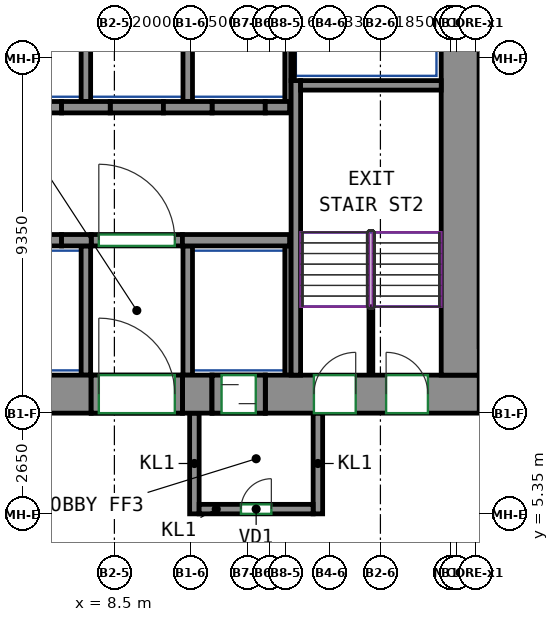
"""IFC4 building model, lengths in metres.
Left out: names, types, materials, properties, quantities, classifications, styles, units other than length and angle.
Written with IfcOpenShell. Run it as: python <this file> out.ifc"""

import sys

from ifc_helpers import new_model, si_unit, direction, frame, frame_2d, origin, place, context, subcontext, project, spatial, rectangle, extrude, source, transform, mapped, element, fill, save


model = new_model("IFC4")
c1 = context("Model", 3, precision=1e-05, world=origin(), true_north=direction((0.0, 1.0)))
c2 = subcontext(c1, "Body", "Model", "MODEL_VIEW")
j1 = project(units=[si_unit("LENGTHUNIT", "METRE"), si_unit("PLANEANGLEUNIT", "RADIAN")], contexts=[c1])
p1 = place(None, origin())
s1 = spatial("IfcSite", under=j1, at=p1, CompositionType="ELEMENT")
p2 = place(p1, origin())
s2 = spatial("IfcBuilding", under=s1, at=p2, CompositionType="ELEMENT")
p3 = place(p2, frame((0.0, 0.0, 95.2)))
s3 = spatial("IfcBuildingStorey", under=s2, at=p3, CompositionType="ELEMENT", Elevation=95.2)
m1 = source(origin(), c2, "Body", "SweptSolid", [
    extrude(rectangle(XDim=14.18, YDim=1.0, at=frame_2d((7.09, 0.0))), origin(), (0.0, 0.0, 1.0), 5.0),
])
p4 = place(p3, frame((-6.29, 8.5, 0.0), z_axis=(0.0, 0.0, 1.0), x_axis=(1.0, 0.0, 0.0)))
e1 = element("IfcWall", 1, at=p4, inside=s3, PredefinedType="SHEAR", context=c2, shape_type="MappedRepresentation", body=[
    mapped(m1, transform((0.0, 0.0, 0.0))),
])
m2 = source(origin(), c2, "Body", "SweptSolid", [
    extrude(rectangle(XDim=0.78, YDim=1.0, at=frame_2d((0.39, 0.0))), origin(), (0.0, 0.0, 1.0), 5.0),
])
p5 = place(p3, frame((10.29, 8.5, 0.0), z_axis=(0.0, 0.0, 1.0), x_axis=(1.0, 0.0, 0.0)))
e2 = element("IfcWall", 2, at=p5, inside=s3, PredefinedType="SHEAR", context=c2, shape_type="MappedRepresentation", body=[
    mapped(m2, transform((0.0, 0.0, 0.0))),
])
m3 = source(origin(), c2, "Body", "SweptSolid", [
    extrude(rectangle(XDim=5.63, YDim=1.0, at=frame_2d((2.815, 0.0))), origin(), (0.0, 0.0, 1.0), 5.0),
])
p6 = place(p3, frame((12.47, 8.5, 0.0), z_axis=(0.0, 0.0, 1.0), x_axis=(1.0, 0.0, 0.0)))
e3 = element("IfcWall", 3, at=p6, inside=s3, PredefinedType="SHEAR", context=c2, shape_type="MappedRepresentation", body=[
    mapped(m3, transform((0.0, 0.0, 0.0))),
])
p7 = place(p6, frame((1.28, 0.0, 0.0)))
e4 = element("IfcOpeningElement", 4, at=p7, cuts=e3, PredefinedType="OPENING", context=c2, shape_type="SweptSolid", body=[
    extrude(rectangle(XDim=1.1, YDim=2.1, at=frame_2d((0.55, 1.05))), frame((0.0, 0.51, 0.0), z_axis=(0.0, -1.0, 0.0), x_axis=(1.0, 0.0, 0.0)), (0.0, 0.0, 1.0), 1.02),
])
p8 = place(p6, frame((3.18, 0.0, 0.0)))
e5 = element("IfcOpeningElement", 5, at=p8, cuts=e3, PredefinedType="OPENING", context=c2, shape_type="SweptSolid", body=[
    extrude(rectangle(XDim=1.1, YDim=2.1, at=frame_2d((0.55, 1.05))), frame((0.0, 0.51, 0.0), z_axis=(0.0, -1.0, 0.0), x_axis=(1.0, 0.0, 0.0)), (0.0, 0.0, 1.0), 1.02),
])
m4 = source(origin(), c2, "Body", "SweptSolid", [
    extrude(rectangle(XDim=12.0, YDim=1.0, at=frame_2d((6.0, 0.0))), origin(), (0.0, 0.0, 1.0), 5.0),
])
p9 = place(p3, frame((17.6, 9.0, 0.0), z_axis=(0.0, 0.0, 1.0), x_axis=(0.0, 1.0, 0.0)))
e6 = element("IfcWall", 6, at=p9, inside=s3, PredefinedType="SHEAR", context=c2, shape_type="MappedRepresentation", body=[
    mapped(m4, transform((0.0, 0.0, 0.0))),
])
m5 = source(origin(), c2, "Body", "SweptSolid", [
    extrude(rectangle(XDim=7.75, YDim=0.25, at=frame_2d((3.875, 0.0))), origin(), (0.0, 0.0, 1.0), 5.0),
])
p10 = place(p3, frame((13.275, 9.0, 0.0), z_axis=(0.0, 0.0, 1.0), x_axis=(0.0, 1.0, 0.0)))
e7 = element("IfcWall", 7, at=p10, inside=s3, PredefinedType="SHEAR", context=c2, shape_type="MappedRepresentation", body=[
    mapped(m5, transform((0.0, 0.0, 0.0))),
])
m6 = source(origin(), c2, "Body", "SweptSolid", [
    extrude(rectangle(XDim=3.7, YDim=0.25, at=frame_2d((1.85, 0.0))), origin(), (0.0, 0.0, 1.0), 5.0),
])
p11 = place(p3, frame((13.4, 16.625, 0.0), z_axis=(0.0, 0.0, 1.0), x_axis=(1.0, 0.0, 0.0)))
e8 = element("IfcWall", 8, at=p11, inside=s3, PredefinedType="SHEAR", context=c2, shape_type="MappedRepresentation", body=[
    mapped(m6, transform((0.0, 0.0, 0.0))),
])
m7 = source(origin(), c2, "Body", "SweptSolid", [
    extrude(rectangle(XDim=0.78, YDim=0.3, at=frame_2d((0.39, 0.0))), origin(), (0.0, 0.0, 1.0), 5.0),
])
p12 = place(p3, frame((7.11, 12.55, 0.0), z_axis=(0.0, 0.0, 1.0), x_axis=(1.0, 0.0, 0.0)))
e9 = element("IfcWall", 9, at=p12, inside=s3, PredefinedType="SHEAR", context=c2, shape_type="MappedRepresentation", body=[
    mapped(m7, transform((0.0, 0.0, 0.0))),
])
m8 = source(origin(), c2, "Body", "SweptSolid", [
    extrude(rectangle(XDim=2.82, YDim=0.3, at=frame_2d((1.41, 0.0))), origin(), (0.0, 0.0, 1.0), 5.0),
])
p13 = place(p3, frame((10.29, 12.55, 0.0), z_axis=(0.0, 0.0, 1.0), x_axis=(1.0, 0.0, 0.0)))
e10 = element("IfcWall", 10, at=p13, inside=s3, PredefinedType="SHEAR", context=c2, shape_type="MappedRepresentation", body=[
    mapped(m8, transform((0.0, 0.0, 0.0))),
])
m9 = source(origin(), c2, "Body", "SweptSolid", [
    extrude(rectangle(XDim=1.28, YDim=0.3, at=frame_2d((0.64, 0.0))), origin(), (0.0, 0.0, 1.0), 5.0),
])
p14 = place(p3, frame((7.11, 16.05, 0.0), z_axis=(0.0, 0.0, 1.0), x_axis=(1.0, 0.0, 0.0)))
e11 = element("IfcWall", 11, at=p14, inside=s3, PredefinedType="SHEAR", context=c2, shape_type="MappedRepresentation", body=[
    mapped(m9, transform((0.0, 0.0, 0.0))),
])
m10 = source(origin(), c2, "Body", "SweptSolid", [
    extrude(rectangle(XDim=1.28, YDim=0.3, at=frame_2d((0.64, 0.0))), origin(), (0.0, 0.0, 1.0), 5.0),
])
p15 = place(p3, frame((9.79, 16.05, 0.0), z_axis=(0.0, 0.0, 1.0), x_axis=(1.0, 0.0, 0.0)))
e12 = element("IfcWall", 12, at=p15, inside=s3, PredefinedType="SHEAR", context=c2, shape_type="MappedRepresentation", body=[
    mapped(m10, transform((0.0, 0.0, 0.0))),
])
m11 = source(origin(), c2, "Body", "SweptSolid", [
    extrude(rectangle(XDim=0.64, YDim=0.3, at=frame_2d((0.32, 0.0))), origin(), (0.0, 0.0, 1.0), 5.0),
])
p16 = place(p3, frame((12.47, 16.05, 0.0), z_axis=(0.0, 0.0, 1.0), x_axis=(1.0, 0.0, 0.0)))
e13 = element("IfcWall", 13, at=p16, inside=s3, PredefinedType="SHEAR", context=c2, shape_type="MappedRepresentation", body=[
    mapped(m11, transform((0.0, 0.0, 0.0))),
])
m12 = source(origin(), c2, "Body", "SweptSolid", [
    extrude(rectangle(XDim=2.4, YDim=1.0, at=frame_2d((1.2, 0.0))), origin(), (0.0, 0.0, 1.0), 0.8),
])
p17 = place(p3, frame((7.89, 8.5, 4.2), z_axis=(0.0, 0.0, 1.0), x_axis=(1.0, 0.0, 0.0)))
e14 = element("IfcWall", 14, at=p17, inside=s3, PredefinedType="SHEAR", context=c2, shape_type="MappedRepresentation", body=[
    mapped(m12, transform((0.0, 0.0, 0.0))),
])
m13 = source(origin(), c2, "Body", "SweptSolid", [
    extrude(rectangle(XDim=1.4, YDim=1.0, at=frame_2d((0.7, 0.0))), origin(), (0.0, 0.0, 1.0), 1.05),
])
p18 = place(p3, frame((11.07, 8.5, 3.95), z_axis=(0.0, 0.0, 1.0), x_axis=(1.0, 0.0, 0.0)))
e15 = element("IfcWall", 15, at=p18, inside=s3, PredefinedType="SHEAR", context=c2, shape_type="MappedRepresentation", body=[
    mapped(m13, transform((0.0, 0.0, 0.0))),
])
m14 = source(origin(), c2, "Body", "SweptSolid", [
    extrude(rectangle(XDim=1.4, YDim=0.3, at=frame_2d((0.7, 0.0))), origin(), (0.0, 0.0, 1.0), 5.0),
])
p19 = place(p3, frame((5.71, 12.55, 0.0), z_axis=(0.0, 0.0, 1.0), x_axis=(1.0, 0.0, 0.0)))
e16 = element("IfcWall", 16, at=p19, inside=s3, PredefinedType="PARTITIONING", context=c2, shape_type="MappedRepresentation", body=[
    mapped(m14, transform((0.0, 0.0, 0.0))),
])
m15 = source(origin(), c2, "Body", "SweptSolid", [
    extrude(rectangle(XDim=1.4, YDim=0.3, at=frame_2d((0.7, 0.0))), origin(), (0.0, 0.0, 1.0), 5.0),
])
p20 = place(p3, frame((11.07, 16.05, 0.0), z_axis=(0.0, 0.0, 1.0), x_axis=(1.0, 0.0, 0.0)))
e17 = element("IfcWall", 17, at=p20, inside=s3, PredefinedType="PARTITIONING", context=c2, shape_type="MappedRepresentation", body=[
    mapped(m15, transform((0.0, 0.0, 0.0))),
])
m16 = source(origin(), c2, "Body", "SweptSolid", [
    extrude(rectangle(XDim=2.4, YDim=0.3, at=frame_2d((1.2, 0.0))), origin(), (0.0, 0.0, 1.0), 5.0),
])
p21 = place(p3, frame((7.89, 12.55, 0.0), z_axis=(0.0, 0.0, 1.0), x_axis=(1.0, 0.0, 0.0)))
e18 = element("IfcWall", 18, at=p21, inside=s3, PredefinedType="PARTITIONING", context=c2, shape_type="MappedRepresentation", body=[
    mapped(m16, transform((0.0, 0.0, 0.0))),
])
p22 = place(p21, frame((0.2, 0.0, 0.0)))
e19 = element("IfcOpeningElement", 19, at=p22, cuts=e18, PredefinedType="OPENING", context=c2, shape_type="SweptSolid", body=[
    extrude(rectangle(XDim=2.0, YDim=2.1, at=frame_2d((1.0, 1.05))), frame((0.0, 0.16, 0.0), z_axis=(0.0, -1.0, 0.0), x_axis=(1.0, 0.0, 0.0)), (0.0, 0.0, 1.0), 0.32),
])
for number, where, z_axis, x_axis in (
    (20, (5.71, 16.05, 0.0), (0.0, 0.0, 1.0), (1.0, 0.0, 0.0)),
    (21, (8.39, 16.05, 0.0), (0.0, 0.0, 1.0), (1.0, 0.0, 0.0)),
):
    element("IfcWall", number, at=place(p3, frame(where, z_axis=z_axis, x_axis=x_axis)), inside=s3, PredefinedType="PARTITIONING", context=c2, shape_type="MappedRepresentation", body=[
        mapped(m14, transform((0.0, 0.0, 0.0))),
    ])
m17 = source(origin(), c2, "Body", "SweptSolid", [
    extrude(rectangle(XDim=2.65, YDim=0.25, at=frame_2d((1.325, 0.0))), origin(), (0.0, 0.0, 1.0), 5.0),
])
for number, where, z_axis, x_axis in (
    (22, (10.605, 5.35, 0.0), (0.0, 0.0, 1.0), (0.0, 1.0, 0.0)),
    (23, (13.855, 5.35, 0.0), (0.0, 0.0, 1.0), (0.0, 1.0, 0.0)),
):
    element("IfcWall", number, at=place(p3, frame(where, z_axis=z_axis, x_axis=x_axis)), inside=s3, PredefinedType="PARTITIONING", context=c2, shape_type="MappedRepresentation", body=[
        mapped(m17, transform((0.0, 0.0, 0.0))),
    ])
m18 = source(origin(), c2, "Body", "SweptSolid", [
    extrude(rectangle(XDim=3.0, YDim=0.25, at=frame_2d((1.5, 0.0))), origin(), (0.0, 0.0, 1.0), 5.0),
])
p23 = place(p3, frame((10.73, 5.475, 0.0), z_axis=(0.0, 0.0, 1.0), x_axis=(1.0, 0.0, 0.0)))
e24 = element("IfcWall", 24, at=p23, inside=s3, PredefinedType="PARTITIONING", context=c2, shape_type="MappedRepresentation", body=[
    mapped(m18, transform((0.0, 0.0, 0.0))),
])
p24 = place(p23, frame((1.1, 0.0, 0.0)))
e25 = element("IfcOpeningElement", 25, at=p24, cuts=e24, PredefinedType="OPENING", context=c2, shape_type="SweptSolid", body=[
    extrude(rectangle(XDim=0.8, YDim=2.0, at=frame_2d((0.4, 1.0))), frame((0.0, 0.135, 0.0), z_axis=(0.0, -1.0, 0.0), x_axis=(1.0, 0.0, 0.0)), (0.0, 0.0, 1.0), 0.27),
])
m19 = source(origin(), c2, "Body", "SweptSolid", [
    extrude(rectangle(XDim=3.275, YDim=0.165, at=frame_2d((1.638, 0.0))), origin(), (0.0, 0.0, 1.0), 5.0),
])
p25 = place(p3, frame((13.067, 16.2, 0.0), z_axis=(0.0, 0.0, 1.0), x_axis=(0.0, 1.0, 0.0)))
e26 = element("IfcWall", 26, at=p25, inside=s3, PredefinedType="PARTITIONING", context=c2, shape_type="MappedRepresentation", body=[
    mapped(m19, transform((0.0, 0.0, 0.0))),
])
m20 = source(origin(), c2, "Body", "SweptSolid", [
    extrude(rectangle(XDim=3.275, YDim=0.25, at=frame_2d((1.638, 0.0))), origin(), (0.0, 0.0, 1.0), 5.0),
])
p26 = place(p3, frame((10.43, 16.2, 0.0), z_axis=(0.0, 0.0, 1.0), x_axis=(0.0, 1.0, 0.0)))
e27 = element("IfcWall", 27, at=p26, inside=s3, PredefinedType="PARTITIONING", context=c2, shape_type="MappedRepresentation", body=[
    mapped(m20, transform((0.0, 0.0, 0.0))),
])
m21 = source(origin(), c2, "Body", "SweptSolid", [
    extrude(rectangle(XDim=2.725, YDim=0.085, at=frame_2d((1.363, 0.0))), origin(), (0.0, 0.0, 1.0), 5.0),
])
p27 = place(p3, frame((13.192, 16.75, 0.0), z_axis=(0.0, 0.0, 1.0), x_axis=(0.0, 1.0, 0.0)))
e28 = element("IfcWall", 28, at=p27, inside=s3, PredefinedType="PARTITIONING", context=c2, shape_type="MappedRepresentation", body=[
    mapped(m21, transform((0.0, 0.0, 0.0))),
])
p28 = place(p3, frame((7.75, 16.2, 0.0), z_axis=(0.0, 0.0, 1.0), x_axis=(0.0, 1.0, 0.0)))
e29 = element("IfcWall", 29, at=p28, inside=s3, PredefinedType="PARTITIONING", context=c2, shape_type="MappedRepresentation", body=[
    mapped(m20, transform((0.0, 0.0, 0.0))),
])
m22 = source(origin(), c2, "Body", "SweptSolid", [
    extrude(rectangle(XDim=3.4, YDim=0.25, at=frame_2d((1.7, 0.0))), origin(), (0.0, 0.0, 1.0), 5.0),
])
p29 = place(p3, frame((10.43, 9.0, 0.0), z_axis=(0.0, 0.0, 1.0), x_axis=(0.0, 1.0, 0.0)))
e30 = element("IfcWall", 30, at=p29, inside=s3, PredefinedType="PARTITIONING", context=c2, shape_type="MappedRepresentation", body=[
    mapped(m22, transform((0.0, 0.0, 0.0))),
])
m23 = source(origin(), c2, "Body", "SweptSolid", [
    extrude(rectangle(XDim=3.4, YDim=0.165, at=frame_2d((1.7, 0.0))), origin(), (0.0, 0.0, 1.0), 5.0),
])
p30 = place(p3, frame((13.067, 9.0, 0.0), z_axis=(0.0, 0.0, 1.0), x_axis=(0.0, 1.0, 0.0)))
e31 = element("IfcWall", 31, at=p30, inside=s3, PredefinedType="PARTITIONING", context=c2, shape_type="MappedRepresentation", body=[
    mapped(m23, transform((0.0, 0.0, 0.0))),
])
p31 = place(p3, frame((7.75, 9.0, 0.0), z_axis=(0.0, 0.0, 1.0), x_axis=(0.0, 1.0, 0.0)))
e32 = element("IfcWall", 32, at=p31, inside=s3, PredefinedType="PARTITIONING", context=c2, shape_type="MappedRepresentation", body=[
    mapped(m22, transform((0.0, 0.0, 0.0))),
])
m24 = source(origin(), c2, "Body", "SweptSolid", [
    extrude(rectangle(XDim=2.4, YDim=1.0, at=frame_2d((1.2, 0.0))), origin(), (0.0, 0.0, 1.0), 2.7),
])
p32 = place(p3, frame((7.89, 8.5, 0.0), z_axis=(0.0, 0.0, 1.0), x_axis=(1.0, 0.0, 0.0)))
e33 = element("IfcWall", 33, at=p32, inside=s3, PredefinedType="PARTITIONING", context=c2, shape_type="MappedRepresentation", body=[
    mapped(m24, transform((0.0, 0.0, 0.0))),
])
p33 = place(p32, frame((0.2, 0.0, 0.0)))
e34 = element("IfcOpeningElement", 34, at=p33, cuts=e33, PredefinedType="OPENING", context=c2, shape_type="SweptSolid", body=[
    extrude(rectangle(XDim=2.0, YDim=2.1, at=frame_2d((1.0, 1.05))), frame((0.0, 0.51, 0.0), z_axis=(0.0, -1.0, 0.0), x_axis=(1.0, 0.0, 0.0)), (0.0, 0.0, 1.0), 1.02),
])
m25 = source(origin(), c2, "Body", "SweptSolid", [
    extrude(rectangle(XDim=1.4, YDim=1.0, at=frame_2d((0.7, 0.0))), origin(), (0.0, 0.0, 1.0), 2.7),
])
p34 = place(p3, frame((11.07, 8.5, 0.0), z_axis=(0.0, 0.0, 1.0), x_axis=(1.0, 0.0, 0.0)))
e35 = element("IfcWall", 35, at=p34, inside=s3, PredefinedType="PARTITIONING", context=c2, shape_type="MappedRepresentation", body=[
    mapped(m25, transform((0.0, 0.0, 0.0))),
])
p35 = place(p34, frame((0.25, 0.0, 0.0)))
e36 = element("IfcOpeningElement", 36, at=p35, cuts=e35, PredefinedType="OPENING", context=c2, shape_type="SweptSolid", body=[
    extrude(rectangle(XDim=0.9, YDim=2.1, at=frame_2d((0.45, 1.05))), frame((0.0, 0.51, 0.0), z_axis=(0.0, -1.0, 0.0), x_axis=(1.0, 0.0, 0.0)), (0.0, 0.0, 1.0), 1.02),
])
m26 = source(origin(), c2, "Body", "SweptSolid", [
    extrude(rectangle(XDim=1.8, YDim=0.1, at=frame_2d((0.9, 0.0))), origin(), (0.0, 0.0, 1.0), 2.5),
])
p36 = place(p3, frame((15.25, 9.0, 0.0), z_axis=(0.0, 0.0, 1.0), x_axis=(0.0, 1.0, 0.0)))
e37 = element("IfcWall", 37, at=p36, inside=s3, PredefinedType="PARTITIONING", context=c2, shape_type="MappedRepresentation", body=[
    mapped(m26, transform((0.0, 0.0, 0.0))),
])
p37 = place(p22, origin())
e38 = element("IfcDoor", 38, at=p37, inside=s3, OperationType="DOUBLE_DOOR_SINGLE_SWING", PredefinedType="DOOR", context=c2, shape_type="SweptSolid", body=[
    extrude(rectangle(XDim=2.0, YDim=2.1, at=frame_2d((1.0, 1.05))), frame((0.0, 0.025, 0.0), z_axis=(0.0, -1.0, 0.0), x_axis=(1.0, 0.0, 0.0)), (0.0, 0.0, 1.0), 0.05),
])
fill(e19, e38)
p38 = place(p33, origin())
e39 = element("IfcDoor", 39, at=p38, inside=s3, OperationType="DOUBLE_DOOR_SINGLE_SWING", PredefinedType="DOOR", context=c2, shape_type="SweptSolid", body=[
    extrude(rectangle(XDim=2.0, YDim=2.1, at=frame_2d((1.0, 1.05))), frame((0.0, 0.405, 0.0), z_axis=(0.0, -1.0, 0.0), x_axis=(1.0, 0.0, 0.0)), (0.0, 0.0, 1.0), 0.05),
])
fill(e34, e39)
p39 = place(p24, origin())
e40 = element("IfcDoor", 40, at=p39, inside=s3, OperationType="SINGLE_SWING_RIGHT", PredefinedType="DOOR", context=c2, shape_type="SweptSolid", body=[
    extrude(rectangle(XDim=0.8, YDim=2.0, at=frame_2d((0.4, 1.0))), frame((0.0, 0.025, 0.0), z_axis=(0.0, -1.0, 0.0), x_axis=(1.0, 0.0, 0.0)), (0.0, 0.0, 1.0), 0.05),
])
fill(e25, e40)
p40 = place(p35, origin())
e41 = element("IfcDoor", 41, at=p40, inside=s3, OperationType="SLIDING_TO_LEFT", PredefinedType="DOOR", context=c2, shape_type="SweptSolid", body=[
    extrude(rectangle(XDim=0.9, YDim=2.1, at=frame_2d((0.45, 1.05))), frame((0.0, 0.405, 0.0), z_axis=(0.0, -1.0, 0.0), x_axis=(1.0, 0.0, 0.0)), (0.0, 0.0, 1.0), 0.05),
])
fill(e36, e41)
p41 = place(p7, origin())
e42 = element("IfcDoor", 42, at=p41, inside=s3, OperationType="SINGLE_SWING_RIGHT", PredefinedType="DOOR", context=c2, shape_type="SweptSolid", body=[
    extrude(rectangle(XDim=1.1, YDim=2.1, at=frame_2d((0.55, 1.05))), frame((0.0, 0.405, 0.0), z_axis=(0.0, -1.0, 0.0), x_axis=(1.0, 0.0, 0.0)), (0.0, 0.0, 1.0), 0.05),
])
fill(e4, e42)
p42 = place(p8, origin())
e43 = element("IfcDoor", 43, at=p42, inside=s3, OperationType="SINGLE_SWING_LEFT", PredefinedType="DOOR", context=c2, shape_type="SweptSolid", body=[
    extrude(rectangle(XDim=1.1, YDim=2.1, at=frame_2d((0.55, 1.05))), frame((0.0, 0.405, 0.0), z_axis=(0.0, -1.0, 0.0), x_axis=(1.0, 0.0, 0.0)), (0.0, 0.0, 1.0), 0.05),
])
fill(e5, e43)
save(model, sys.argv[1])
